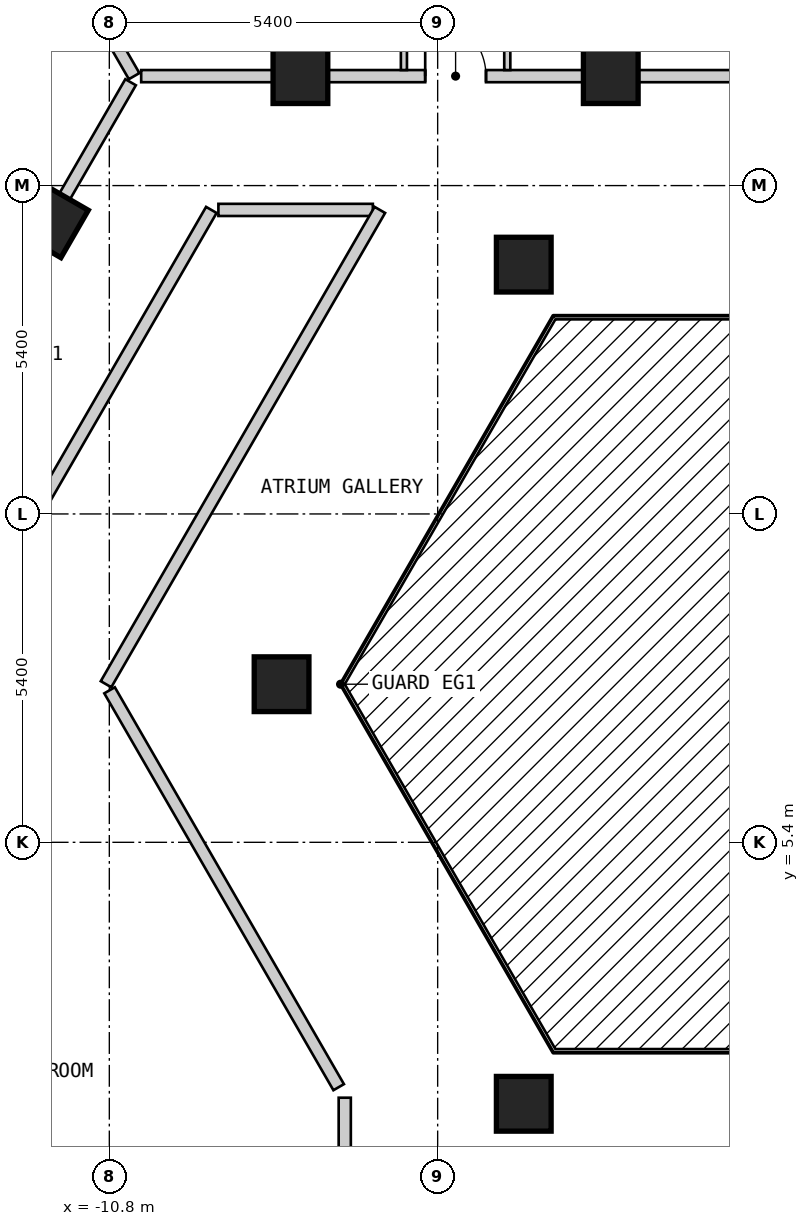
"""IFC4 building model, lengths in metres.
Left out: names, types, materials, properties, quantities, classifications, styles, units other than length and angle.
Written with IfcOpenShell. Run it as: python <this file> out.ifc"""

import sys

from ifc_helpers import new_model, si_unit, direction, frame, frame_2d, origin, origin_2d, place, context, subcontext, project, spatial, rectangle, extrude, element, fill, save


model = new_model("IFC4")
c1 = context("Model", 3, precision=1e-05, world=origin(), true_north=direction((0.0, 1.0)))
c2 = subcontext(c1, "Body", "Model", "MODEL_VIEW")
j1 = project(units=[si_unit("LENGTHUNIT", "METRE"), si_unit("PLANEANGLEUNIT", "RADIAN")], contexts=[c1])
p1 = place(None, origin())
s1 = spatial("IfcSite", under=j1, at=p1, CompositionType="ELEMENT")
p2 = place(p1, origin())
s2 = spatial("IfcBuilding", under=s1, at=p2, CompositionType="ELEMENT")
p3 = place(p2, frame((0.0, 0.0, 41.4)))
s3 = spatial("IfcBuildingStorey", under=s2, at=p3, CompositionType="ELEMENT", Elevation=41.4)
for number, where, z_axis, x_axis in (
    (1, (-2.553, 18.0, 0.0), (0.0, 0.0, 1.0), (-1.0, 0.0, 0.0)),
    (2, (-3.984, 14.9, 0.0), (0.0, 0.0, 1.0), (1.0, 0.0, 0.0)),
    (3, (-7.657, 18.0, 0.0), (0.0, 0.0, 1.0), (-1.0, 0.0, 0.0)),
    (4, (-11.761, 15.63, 0.0), (0.0, 0.0, 1.0), (-0.5, -0.866, 0.0)),
    (5, (-7.967, 8.0, 0.0), (0.0, 0.0, 1.0), (1.0, 0.0, 0.0)),
    (6, (-3.984, 1.1, 0.0), (0.0, 0.0, 1.0), (1.0, 0.0, 0.0)),
):
    element("IfcColumn", number, at=place(p3, frame(where, z_axis=z_axis, x_axis=x_axis)), inside=s3, PredefinedType="COLUMN", context=c2, shape_type="SweptSolid", body=[
        extrude(rectangle(XDim=0.9, YDim=0.9, at=origin_2d()), origin(), (0.0, 0.0, 1.0), 3.0),
    ])
p4 = place(p3, frame((-10.796, 7.9, 0.0), z_axis=(0.0, 0.0, 1.0), x_axis=(0.499954271211, -0.866051803703, 0.0)))
e7 = element("IfcWall", 7, at=p4, inside=s3, PredefinedType="PARTITIONING", context=c2, shape_type="SweptSolid", body=[
    extrude(rectangle(XDim=7.536, YDim=0.2, at=frame_2d((3.768, 0.0))), origin(), (0.0, 0.0, 1.0), 2.7),
])
p5 = place(p3, frame((-9.006, 15.8, 0.0), z_axis=(0.0, 0.0, 1.0), x_axis=(1.0, 0.0, 0.0)))
e8 = element("IfcWall", 8, at=p5, inside=s3, PredefinedType="PARTITIONING", context=c2, shape_type="SweptSolid", body=[
    extrude(rectangle(XDim=2.54, YDim=0.2, at=frame_2d((1.27, 0.0))), origin(), (0.0, 0.0, 1.0), 2.7),
])
p6 = place(p3, frame((-10.276, 18.0, 0.0), z_axis=(0.0, 0.0, 1.0), x_axis=(1.0, 0.0, 0.0)))
e9 = element("IfcWall", 9, at=p6, inside=s3, PredefinedType="PARTITIONING", context=c2, shape_type="SweptSolid", body=[
    extrude(rectangle(XDim=20.558, YDim=0.2, at=frame_2d((10.279, 0.0))), origin(), (0.0, 0.0, 1.0), 2.7),
])
p7 = place(p6, frame((19.265, 0.0, 0.0)))
e10 = element("IfcOpeningElement", 10, at=p7, cuts=e9, PredefinedType="OPENING", context=c2, shape_type="SweptSolid", body=[
    extrude(rectangle(XDim=1.0, YDim=2.1, at=frame_2d((0.5, 1.05))), frame((0.0, 0.11, 0.0), z_axis=(0.0, -1.0, 0.0), x_axis=(1.0, 0.0, 0.0)), (0.0, 0.0, 1.0), 0.22),
])
p8 = place(p6, frame((14.879, 0.0, 0.0)))
e11 = element("IfcOpeningElement", 11, at=p8, cuts=e9, PredefinedType="OPENING", context=c2, shape_type="SweptSolid", body=[
    extrude(rectangle(XDim=1.0, YDim=2.1, at=frame_2d((0.5, 1.05))), frame((0.0, 0.11, 0.0), z_axis=(0.0, -1.0, 0.0), x_axis=(1.0, 0.0, 0.0)), (0.0, 0.0, 1.0), 0.22),
])
p9 = place(p6, frame((4.671, 0.0, 0.0)))
e12 = element("IfcOpeningElement", 12, at=p9, cuts=e9, PredefinedType="OPENING", context=c2, shape_type="SweptSolid", body=[
    extrude(rectangle(XDim=1.0, YDim=2.1, at=frame_2d((0.5, 1.05))), frame((0.0, 0.11, 0.0), z_axis=(0.0, -1.0, 0.0), x_axis=(1.0, 0.0, 0.0)), (0.0, 0.0, 1.0), 0.22),
])
p10 = place(p3, frame((-10.854, 8.0, 0.0), z_axis=(0.0, 0.0, 1.0), x_axis=(0.499964141897, 0.86604610548, 0.0)))
e13 = element("IfcWall", 13, at=p10, inside=s3, PredefinedType="PARTITIONING", context=c2, shape_type="SweptSolid", body=[
    extrude(rectangle(XDim=9.007, YDim=0.2, at=frame_2d((4.503, 0.0))), origin(), (0.0, 0.0, 1.0), 2.7),
])
p11 = place(p3, frame((-18.244, -0.001, 0.0), z_axis=(0.0, 0.0, 1.0), x_axis=(0.499962999376, 0.866046765051, 0.0)))
e14 = element("IfcWall", 14, at=p11, inside=s3, PredefinedType="PARTITIONING", context=c2, shape_type="SweptSolid", body=[
    extrude(rectangle(XDim=18.245, YDim=0.2, at=frame_2d((9.123, 0.0))), origin(), (0.0, 0.0, 1.0), 2.7),
])
p12 = place(p11, frame((8.672, 0.0, 0.0)))
e15 = element("IfcOpeningElement", 15, at=p12, cuts=e14, PredefinedType="OPENING", context=c2, shape_type="SweptSolid", body=[
    extrude(rectangle(XDim=0.9, YDim=2.1, at=frame_2d((0.45, 1.05))), frame((0.0, 0.11, 0.0), z_axis=(0.0, -1.0, 0.0), x_axis=(1.0, 0.0, 0.0)), (0.0, 0.0, 1.0), 0.22),
])
p13 = place(p3, frame((-20.727, 0.099, 0.0), z_axis=(0.0, 0.0, 1.0), x_axis=(0.499993204491, 0.866029327138, 0.0)))
e16 = element("IfcWall", 16, at=p13, inside=s3, PredefinedType="PARTITIONING", context=c2, shape_type="SweptSolid", body=[
    extrude(rectangle(XDim=20.554, YDim=0.2, at=frame_2d((10.277, 0.0))), origin(), (0.0, 0.0, 1.0), 2.7),
])
p14 = place(p13, frame((14.88, 0.0, 0.0)))
e17 = element("IfcOpeningElement", 17, at=p14, cuts=e16, PredefinedType="OPENING", context=c2, shape_type="SweptSolid", body=[
    extrude(rectangle(XDim=1.0, YDim=2.1, at=frame_2d((0.5, 1.05))), frame((0.0, 0.11, 0.0), z_axis=(0.0, -1.0, 0.0), x_axis=(1.0, 0.0, 0.0)), (0.0, 0.0, 1.0), 0.22),
])
p15 = place(p13, frame((4.673, 0.0, 0.0)))
e18 = element("IfcOpeningElement", 18, at=p15, cuts=e16, PredefinedType="OPENING", context=c2, shape_type="SweptSolid", body=[
    extrude(rectangle(XDim=1.0, YDim=2.1, at=frame_2d((0.5, 1.05))), frame((0.0, 0.11, 0.0), z_axis=(0.0, -1.0, 0.0), x_axis=(1.0, 0.0, 0.0)), (0.0, 0.0, 1.0), 0.22),
])
p16 = place(p13, frame((0.838, 0.0, 0.0)))
e19 = element("IfcOpeningElement", 19, at=p16, cuts=e16, PredefinedType="OPENING", context=c2, shape_type="SweptSolid", body=[
    extrude(rectangle(XDim=0.8, YDim=2.1, at=frame_2d((0.4, 1.05))), frame((0.0, 0.11, 0.0), z_axis=(0.0, -1.0, 0.0), x_axis=(1.0, 0.0, 0.0)), (0.0, 0.0, 1.0), 0.22),
])
p17 = place(p3, frame((-6.928, -2.8, 0.0), z_axis=(0.0, 0.0, 1.0), x_axis=(0.0, 1.0, 0.0)))
e20 = element("IfcWall", 20, at=p17, inside=s3, PredefinedType="PARTITIONING", context=c2, shape_type="SweptSolid", body=[
    extrude(rectangle(XDim=4.0, YDim=0.2, at=frame_2d((2.0, 0.0))), origin(), (0.0, 0.0, 1.0), 2.7),
])
p18 = place(p3, frame((-4.255, 18.1, 0.0), z_axis=(0.0, 0.0, 1.0), x_axis=(0.0, 1.0, 0.0)))
e21 = element("IfcWall", 21, at=p18, inside=s3, PredefinedType="PARTITIONING", context=c2, shape_type="SweptSolid", body=[
    extrude(rectangle(XDim=4.05, YDim=0.1, at=frame_2d((2.025, 0.0))), origin(), (0.0, 0.0, 1.0), 2.7),
])
p19 = place(p18, frame((1.55, 0.0, 0.0)))
e22 = element("IfcOpeningElement", 22, at=p19, cuts=e21, PredefinedType="OPENING", context=c2, shape_type="SweptSolid", body=[
    extrude(rectangle(XDim=0.9, YDim=2.1, at=frame_2d((0.45, 1.05))), frame((0.0, 0.06, 0.0), z_axis=(0.0, -1.0, 0.0), x_axis=(1.0, 0.0, 0.0)), (0.0, 0.0, 1.0), 0.12),
])
p20 = place(p3, frame((-5.955, 18.1, 0.0), z_axis=(0.0, 0.0, 1.0), x_axis=(0.0, 1.0, 0.0)))
e23 = element("IfcWall", 23, at=p20, inside=s3, PredefinedType="PARTITIONING", context=c2, shape_type="SweptSolid", body=[
    extrude(rectangle(XDim=4.05, YDim=0.1, at=frame_2d((2.025, 0.0))), origin(), (0.0, 0.0, 1.0), 2.7),
])
p21 = place(p20, frame((1.6, 0.0, 0.0)))
e24 = element("IfcOpeningElement", 24, at=p21, cuts=e23, PredefinedType="OPENING", context=c2, shape_type="SweptSolid", body=[
    extrude(rectangle(XDim=0.8, YDim=2.1, at=frame_2d((0.4, 1.05))), frame((0.0, 0.06, 0.0), z_axis=(0.0, -1.0, 0.0), x_axis=(1.0, 0.0, 0.0)), (0.0, 0.0, 1.0), 0.12),
])
p22 = place(p3, frame((-7.657, 18.1, 0.0), z_axis=(0.0, 0.0, 1.0), x_axis=(0.0, 1.0, 0.0)))
e25 = element("IfcWall", 25, at=p22, inside=s3, PredefinedType="PARTITIONING", context=c2, shape_type="SweptSolid", body=[
    extrude(rectangle(XDim=4.1, YDim=0.1, at=frame_2d((2.05, 0.0))), origin(), (0.0, 0.0, 1.0), 2.7),
])
p23 = place(p3, frame((-12.659, 21.926, 0.0), z_axis=(0.0, 0.0, 1.0), x_axis=(0.500025458316, -0.86601070492, 0.0)))
e26 = element("IfcWall", 26, at=p23, inside=s3, PredefinedType="PARTITIONING", context=c2, shape_type="SweptSolid", body=[
    extrude(rectangle(XDim=4.533, YDim=0.2, at=frame_2d((2.267, 0.0))), origin(), (0.0, 0.0, 1.0), 2.7),
])
p24 = place(p3, frame((-2.553, 18.1, 0.0), z_axis=(0.0, 0.0, 1.0), x_axis=(0.0, 1.0, 0.0)))
e27 = element("IfcWall", 27, at=p24, inside=s3, PredefinedType="PARTITIONING", context=c2, shape_type="SweptSolid", body=[
    extrude(rectangle(XDim=3.5, YDim=0.2, at=frame_2d((1.75, 0.0))), origin(), (0.0, 0.0, 1.0), 2.7),
])
p25 = place(p9, origin())
e28 = element("IfcDoor", 28, at=p25, inside=s3, OperationType="SINGLE_SWING_LEFT", PredefinedType="DOOR", context=c2, shape_type="SweptSolid", body=[
    extrude(rectangle(XDim=1.0, YDim=2.1, at=frame_2d((0.5, 1.05))), frame((0.0, 0.025, 0.0), z_axis=(0.0, -1.0, 0.0), x_axis=(1.0, 0.0, 0.0)), (0.0, 0.0, 1.0), 0.05),
])
fill(e12, e28)
save(model, sys.argv[1])
